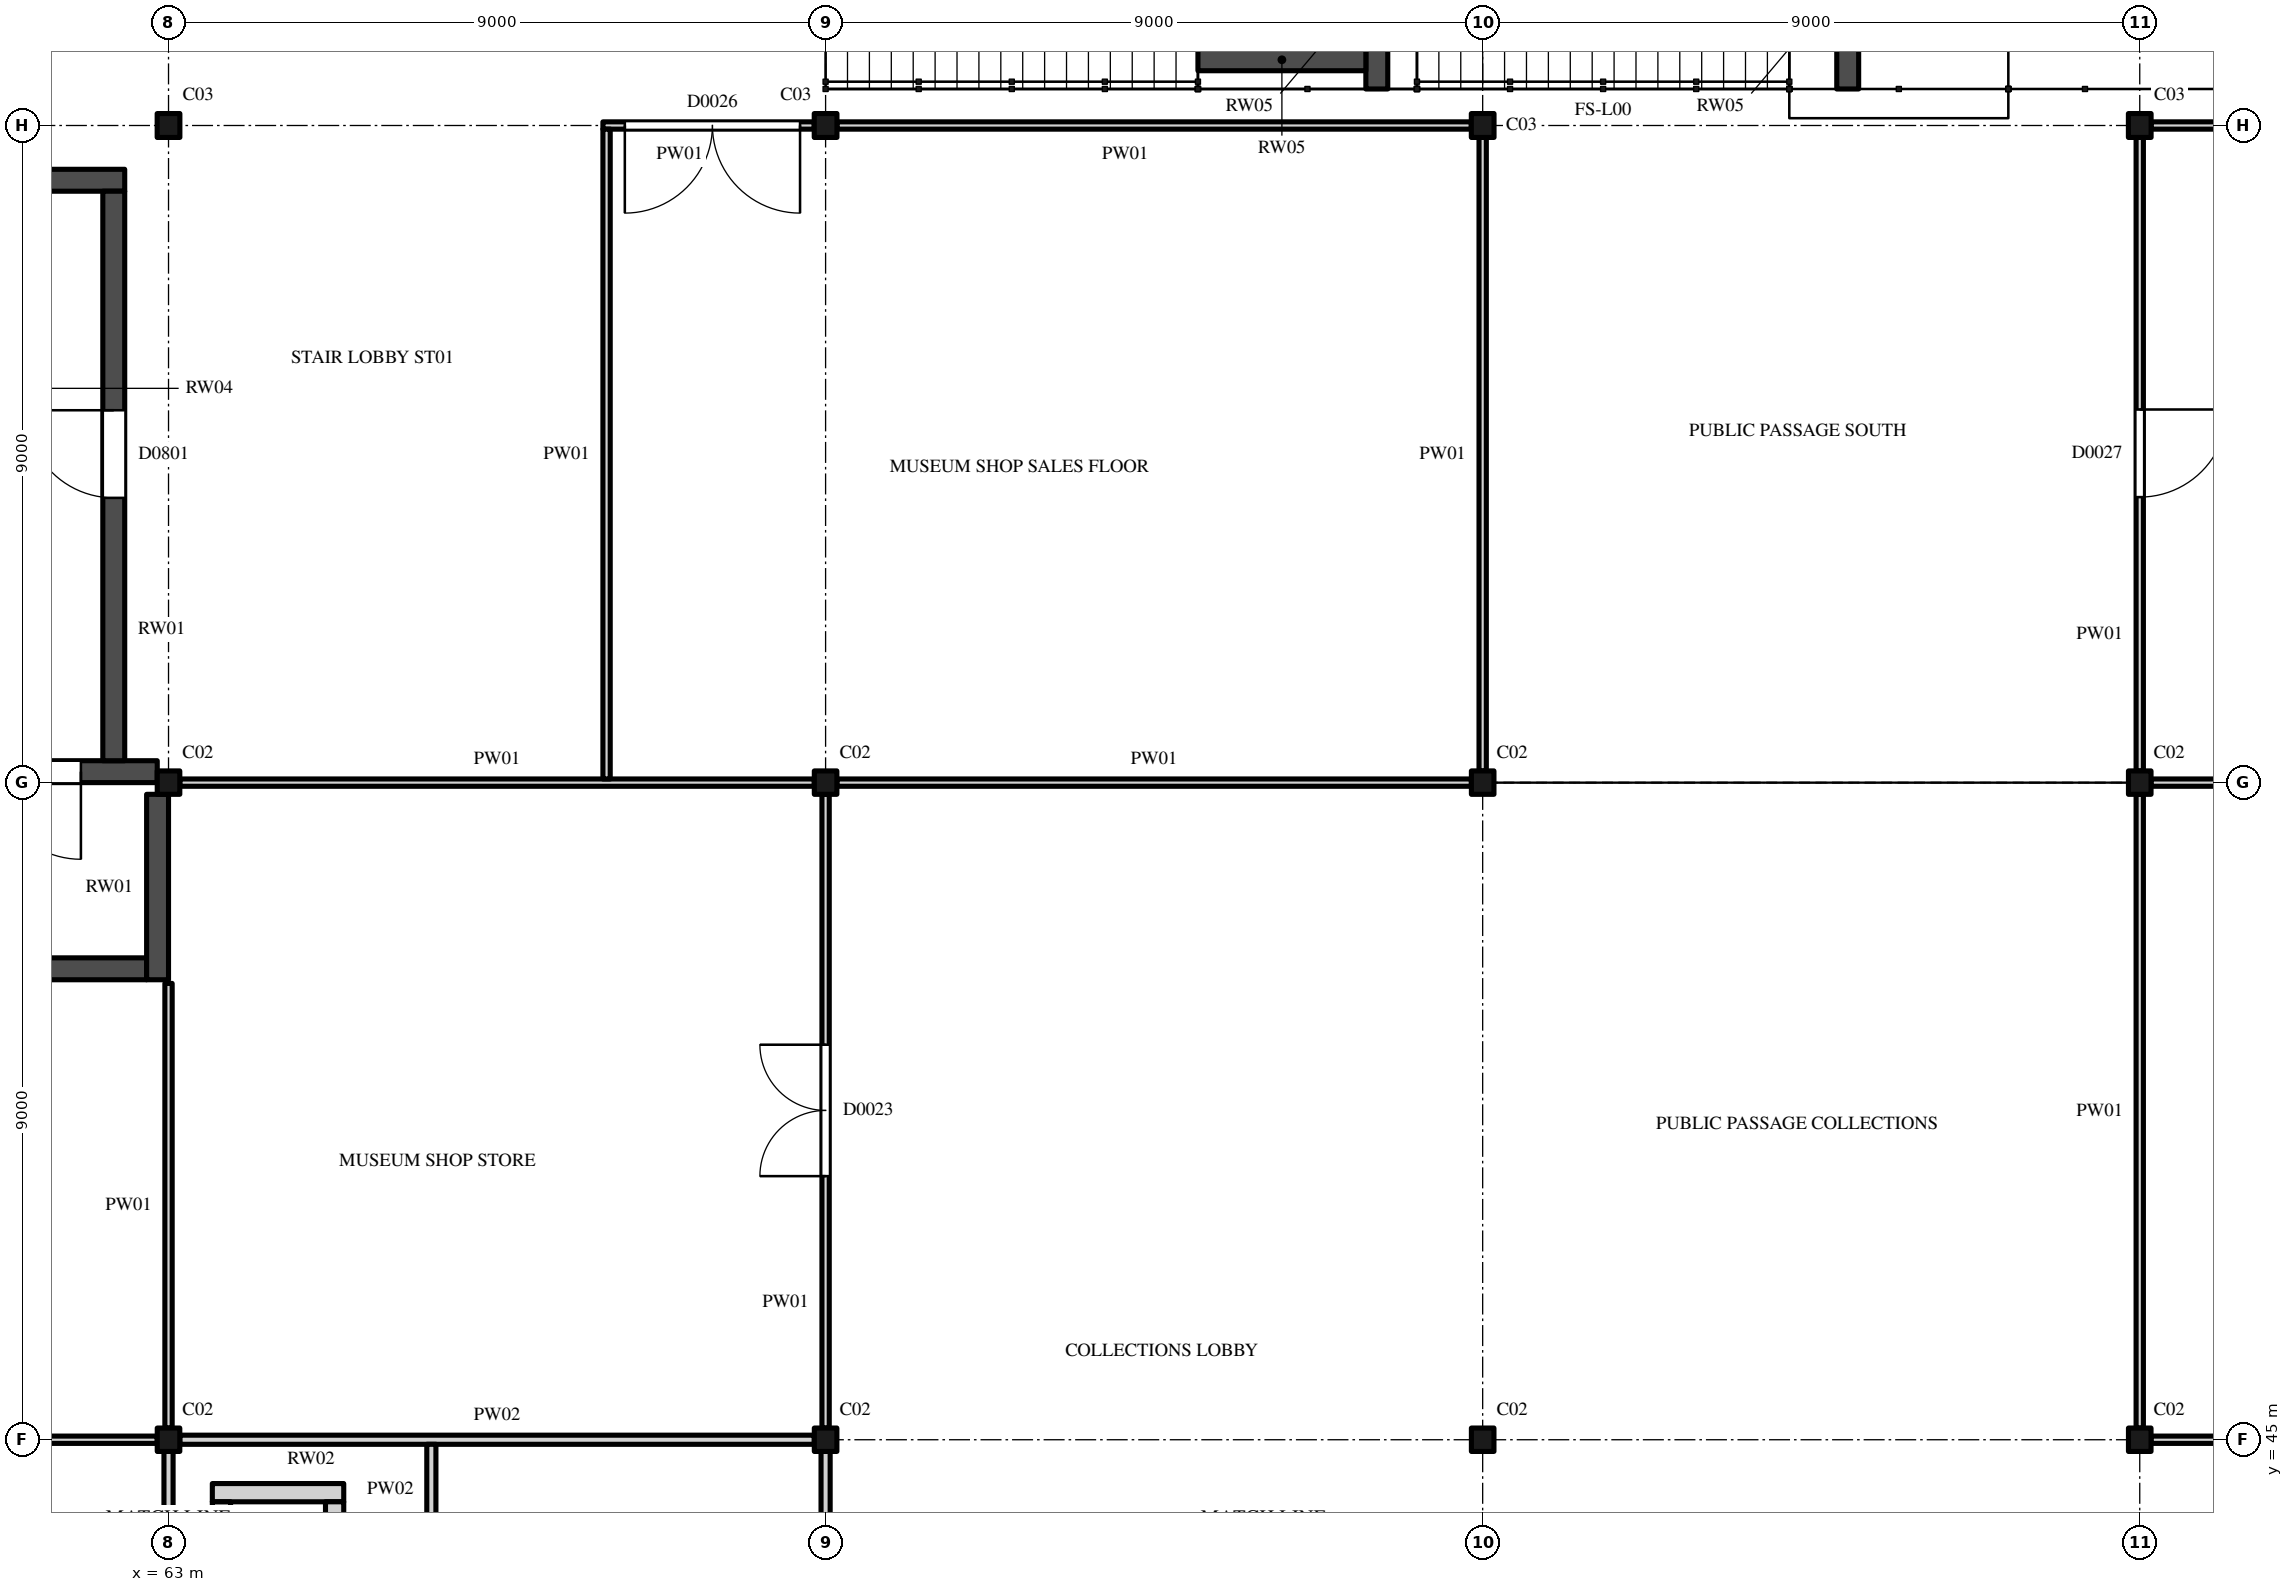
"""IFC4 building model, lengths in metres.
Left out: names, types, materials, properties, quantities, classifications, styles, units other than length and angle.
Written with IfcOpenShell. Run it as: python <this file> out.ifc"""

import sys

from ifc_helpers import new_model, si_unit, direction, frame, frame_2d, origin, origin_2d, place, context, subcontext, project, spatial, rectangle, i_section, extrude, element, fill, save


model = new_model("IFC4")
c1 = context("Model", 3, precision=1e-05, world=origin(), true_north=direction((0.0, 1.0)))
c2 = subcontext(c1, "Body", "Model", "MODEL_VIEW")
j1 = project(units=[si_unit("LENGTHUNIT", "METRE"), si_unit("PLANEANGLEUNIT", "RADIAN")], contexts=[c1])
p1 = place(None, origin())
s1 = spatial("IfcSite", under=j1, at=p1, CompositionType="ELEMENT")
p2 = place(p1, origin())
s2 = spatial("IfcBuilding", under=s1, at=p2, CompositionType="ELEMENT")
p3 = place(p2, origin())
s3 = spatial("IfcBuildingStorey", under=s2, at=p3, CompositionType="ELEMENT", Elevation=0.0)
for number, where, z_axis, x_axis in (
    (1, (63.0, 45.0, 0.0), (0.0, 0.0, 1.0), (1.0, 0.0, 0.0)),
    (2, (72.0, 45.0, 0.0), (0.0, 0.0, 1.0), (1.0, 0.0, 0.0)),
    (3, (81.0, 45.0, 0.0), (0.0, 0.0, 1.0), (1.0, 0.0, 0.0)),
    (4, (90.0, 45.0, 0.0), (0.0, 0.0, 1.0), (1.0, 0.0, 0.0)),
    (5, (63.0, 54.0, 0.0), (0.0, 0.0, 1.0), (1.0, 0.0, 0.0)),
    (6, (72.0, 54.0, 0.0), (0.0, 0.0, 1.0), (1.0, 0.0, 0.0)),
    (7, (81.0, 54.0, 0.0), (0.0, 0.0, 1.0), (1.0, 0.0, 0.0)),
    (8, (90.0, 54.0, 0.0), (0.0, 0.0, 1.0), (1.0, 0.0, 0.0)),
):
    element("IfcColumn", number, at=place(p3, frame(where, z_axis=z_axis, x_axis=x_axis)), inside=s3, PredefinedType="COLUMN", context=c2, shape_type="SweptSolid", body=[
        extrude(i_section(OverallWidth=0.309, OverallDepth=0.321, WebThickness=0.014, FlangeThickness=0.022, FilletRadius=0.017, at=origin_2d()), origin(), (0.0, 0.0, 1.0), 6.0),
    ])
for number, where, z_axis, x_axis in (
    (9, (63.0, 63.0, 0.0), (0.0, 0.0, 1.0), (1.0, 0.0, 0.0)),
    (10, (72.0, 63.0, 0.0), (0.0, 0.0, 1.0), (1.0, 0.0, 0.0)),
    (11, (81.0, 63.0, 0.0), (0.0, 0.0, 1.0), (1.0, 0.0, 0.0)),
    (12, (90.0, 63.0, 0.0), (0.0, 0.0, 1.0), (1.0, 0.0, 0.0)),
):
    element("IfcColumn", number, at=place(p3, frame(where, z_axis=z_axis, x_axis=x_axis)), inside=s3, PredefinedType="COLUMN", context=c2, shape_type="SweptSolid", body=[
        extrude(i_section(OverallWidth=0.311, OverallDepth=0.327, WebThickness=0.016, FlangeThickness=0.025, FilletRadius=0.017, at=origin_2d()), origin(), (0.0, 0.0, 1.0), 6.0),
    ])
p4 = place(p3, frame((54.3, 54.15, 0.0), z_axis=(0.0, 0.0, 1.0), x_axis=(1.0, 0.0, 0.0)))
e13 = element("IfcWall", 13, at=p4, inside=s3, PredefinedType="SHEAR", context=c2, shape_type="SweptSolid", body=[
    extrude(rectangle(XDim=8.545, YDim=0.3, at=frame_2d((4.273, 0.0))), origin(), (0.0, 0.0, 1.0), 6.0),
])
p5 = place(p4, frame((6.3, 0.0, 0.0)))
e14 = element("IfcOpeningElement", 14, at=p5, cuts=e13, PredefinedType="OPENING", context=c2, shape_type="SweptSolid", body=[
    extrude(rectangle(XDim=1.2, YDim=2.1, at=frame_2d((0.6, 1.05))), frame((0.0, 0.16, 0.0), z_axis=(0.0, -1.0, 0.0), x_axis=(1.0, 0.0, 0.0)), (0.0, 0.0, 1.0), 0.32),
])
p6 = place(p3, frame((54.3, 62.25, 0.0), z_axis=(0.0, 0.0, 1.0), x_axis=(1.0, 0.0, 0.0)))
e15 = element("IfcWall", 15, at=p6, inside=s3, PredefinedType="SHEAR", context=c2, shape_type="SweptSolid", body=[
    extrude(rectangle(XDim=8.1, YDim=0.3, at=frame_2d((4.05, 0.0))), origin(), (0.0, 0.0, 1.0), 6.0),
])
p7 = place(p3, frame((62.25, 54.3, 0.0), z_axis=(0.0, 0.0, 1.0), x_axis=(0.0, 1.0, 0.0)))
e16 = element("IfcWall", 16, at=p7, inside=s3, PredefinedType="SHEAR", context=c2, shape_type="SweptSolid", body=[
    extrude(rectangle(XDim=7.8, YDim=0.3, at=frame_2d((3.9, 0.0))), origin(), (0.0, 0.0, 1.0), 6.0),
])
p8 = place(p7, frame((3.6, 0.0, 0.0)))
e17 = element("IfcOpeningElement", 17, at=p8, cuts=e16, PredefinedType="OPENING", context=c2, shape_type="SweptSolid", body=[
    extrude(rectangle(XDim=1.2, YDim=2.1, at=frame_2d((0.6, 1.05))), frame((0.0, 0.16, 0.0), z_axis=(0.0, -1.0, 0.0), x_axis=(1.0, 0.0, 0.0)), (0.0, 0.0, 1.0), 0.32),
])
p9 = place(p3, frame((54.3, 51.45, 0.0), z_axis=(0.0, 0.0, 1.0), x_axis=(1.0, 0.0, 0.0)))
e18 = element("IfcWall", 18, at=p9, inside=s3, PredefinedType="SHEAR", context=c2, shape_type="SweptSolid", body=[
    extrude(rectangle(XDim=8.4, YDim=0.3, at=frame_2d((4.2, 0.0))), origin(), (0.0, 0.0, 1.0), 6.0),
])
p10 = place(p3, frame((62.85, 51.3, 0.0), z_axis=(0.0, 0.0, 1.0), x_axis=(0.0, 1.0, 0.0)))
e19 = element("IfcWall", 19, at=p10, inside=s3, PredefinedType="SHEAR", context=c2, shape_type="SweptSolid", body=[
    extrude(rectangle(XDim=2.54, YDim=0.3, at=frame_2d((1.27, 0.0))), origin(), (0.0, 0.0, 1.0), 6.0),
])
p11 = place(p3, frame((63.6, 44.275, 0.0), z_axis=(0.0, 0.0, 1.0), x_axis=(1.0, 0.0, 0.0)))
e20 = element("IfcWall", 20, at=p11, inside=s3, PredefinedType="STANDARD", context=c2, shape_type="SweptSolid", body=[
    extrude(rectangle(XDim=1.8, YDim=0.25, at=frame_2d((0.9, 0.0))), origin(), (0.0, 0.0, 1.0), 6.0),
])
p12 = place(p3, frame((63.725, 41.65, 0.0), z_axis=(0.0, 0.0, 1.0), x_axis=(0.0, 1.0, 0.0)))
e21 = element("IfcWall", 21, at=p12, inside=s3, PredefinedType="STANDARD", context=c2, shape_type="SweptSolid", body=[
    extrude(rectangle(XDim=2.5, YDim=0.25, at=frame_2d((1.25, 0.0))), origin(), (0.0, 0.0, 1.0), 6.0),
])
p13 = place(p3, frame((65.275, 41.65, 0.0), z_axis=(0.0, 0.0, 1.0), x_axis=(0.0, 1.0, 0.0)))
e22 = element("IfcWall", 22, at=p13, inside=s3, PredefinedType="STANDARD", context=c2, shape_type="SweptSolid", body=[
    extrude(rectangle(XDim=2.5, YDim=0.25, at=frame_2d((1.25, 0.0))), origin(), (0.0, 0.0, 1.0), 6.0),
])
p14 = place(p13, frame((0.8, 0.0, 0.0)))
e23 = element("IfcOpeningElement", 23, at=p14, cuts=e22, PredefinedType="OPENING", context=c2, shape_type="SweptSolid", body=[
    extrude(rectangle(XDim=0.9, YDim=2.1, at=frame_2d((0.45, 1.05))), frame((0.0, 0.135, 0.0), z_axis=(0.0, -1.0, 0.0), x_axis=(1.0, 0.0, 0.0)), (0.0, 0.0, 1.0), 0.27),
])
p15 = place(p3, frame((79.55, 63.5, 0.0), z_axis=(0.0, 0.0, 1.0), x_axis=(0.0, 1.0, 0.0)))
e24 = element("IfcWall", 24, at=p15, inside=s3, PredefinedType="SHEAR", context=c2, shape_type="SweptSolid", body=[
    extrude(rectangle(XDim=3.0, YDim=0.3, at=frame_2d((1.5, 0.0))), origin(), (0.0, 0.0, 1.0), 2.8),
])
p16 = place(p3, frame((77.1, 63.9, 0.0), z_axis=(0.0, 0.0, 1.0), x_axis=(1.0, 0.0, 0.0)))
e25 = element("IfcWall", 25, at=p16, inside=s3, PredefinedType="SHEAR", context=c2, shape_type="SweptSolid", body=[
    extrude(rectangle(XDim=2.3, YDim=0.3, at=frame_2d((1.15, 0.0))), origin(), (0.0, 0.0, 1.0), 2.8),
])
p17 = place(p3, frame((86.0, 63.5, 0.0), z_axis=(0.0, 0.0, 1.0), x_axis=(0.0, 1.0, 0.0)))
e26 = element("IfcWall", 26, at=p17, inside=s3, PredefinedType="SHEAR", context=c2, shape_type="SweptSolid", body=[
    extrude(rectangle(XDim=3.0, YDim=0.3, at=frame_2d((1.5, 0.0))), origin(), (0.0, 0.0, 1.0), 5.8),
])
p18 = place(p3, frame((54.35, 45.0, 0.0), z_axis=(0.0, 0.0, 1.0), x_axis=(1.0, 0.0, 0.0)))
e27 = element("IfcWall", 27, at=p18, inside=s3, PredefinedType="PARTITIONING", context=c2, shape_type="SweptSolid", body=[
    extrude(rectangle(XDim=8.495, YDim=0.1, at=frame_2d((4.248, 0.0))), origin(), (0.0, 0.0, 1.0), 5.419),
])
p19 = place(p3, frame((63.155, 45.0, 0.0), z_axis=(0.0, 0.0, 1.0), x_axis=(1.0, 0.0, 0.0)))
e28 = element("IfcWall", 28, at=p19, inside=s3, PredefinedType="PARTITIONING", context=c2, shape_type="SweptSolid", body=[
    extrude(rectangle(XDim=8.691, YDim=0.125, at=frame_2d((4.345, 0.0))), origin(), (0.0, 0.0, 1.0), 5.419),
])
p20 = place(p3, frame((90.155, 45.0, 0.0), z_axis=(0.0, 0.0, 1.0), x_axis=(1.0, 0.0, 0.0)))
e29 = element("IfcWall", 29, at=p20, inside=s3, PredefinedType="PARTITIONING", context=c2, shape_type="SweptSolid", body=[
    extrude(rectangle(XDim=8.691, YDim=0.1, at=frame_2d((4.345, 0.0))), origin(), (0.0, 0.0, 1.0), 5.419),
])
p21 = place(p20, frame((3.85, 0.0, 0.0)))
e30 = element("IfcOpeningElement", 30, at=p21, cuts=e29, PredefinedType="OPENING", context=c2, shape_type="SweptSolid", body=[
    extrude(rectangle(XDim=1.0, YDim=2.1, at=frame_2d((0.5, 1.05))), frame((0.0, 0.06, 0.0), z_axis=(0.0, -1.0, 0.0), x_axis=(1.0, 0.0, 0.0)), (0.0, 0.0, 1.0), 0.12),
])
for number, where, z_axis, x_axis in (
    (31, (63.155, 54.0, 0.0), (0.0, 0.0, 1.0), (1.0, 0.0, 0.0)),
    (32, (72.155, 54.0, 0.0), (0.0, 0.0, 1.0), (1.0, 0.0, 0.0)),
    (33, (90.155, 54.0, 0.0), (0.0, 0.0, 1.0), (1.0, 0.0, 0.0)),
):
    element("IfcWall", number, at=place(p3, frame(where, z_axis=z_axis, x_axis=x_axis)), inside=s3, PredefinedType="PARTITIONING", context=c2, shape_type="SweptSolid", body=[
        extrude(rectangle(XDim=8.691, YDim=0.1, at=frame_2d((4.345, 0.0))), origin(), (0.0, 0.0, 1.0), 5.466),
    ])
p22 = place(p3, frame((68.95, 63.0, 0.0), z_axis=(0.0, 0.0, 1.0), x_axis=(1.0, 0.0, 0.0)))
e34 = element("IfcWall", 34, at=p22, inside=s3, PredefinedType="PARTITIONING", context=c2, shape_type="SweptSolid", body=[
    extrude(rectangle(XDim=2.895, YDim=0.1, at=frame_2d((1.447, 0.0))), origin(), (0.0, 0.0, 1.0), 5.422),
])
p23 = place(p22, frame((0.3, 0.0, 0.0)))
e35 = element("IfcOpeningElement", 35, at=p23, cuts=e34, PredefinedType="OPENING", context=c2, shape_type="SweptSolid", body=[
    extrude(rectangle(XDim=2.4, YDim=2.4, at=frame_2d((1.2, 1.2))), frame((0.0, 0.06, 0.0), z_axis=(0.0, -1.0, 0.0), x_axis=(1.0, 0.0, 0.0)), (0.0, 0.0, 1.0), 0.12),
])
p24 = place(p3, frame((72.156, 63.0, 0.0), z_axis=(0.0, 0.0, 1.0), x_axis=(1.0, 0.0, 0.0)))
e36 = element("IfcWall", 36, at=p24, inside=s3, PredefinedType="PARTITIONING", context=c2, shape_type="SweptSolid", body=[
    extrude(rectangle(XDim=8.689, YDim=0.1, at=frame_2d((4.344, 0.0))), origin(), (0.0, 0.0, 1.0), 5.422),
])
p25 = place(p3, frame((90.156, 63.0, 0.0), z_axis=(0.0, 0.0, 1.0), x_axis=(1.0, 0.0, 0.0)))
e37 = element("IfcWall", 37, at=p25, inside=s3, PredefinedType="PARTITIONING", context=c2, shape_type="SweptSolid", body=[
    extrude(rectangle(XDim=5.907, YDim=0.1, at=frame_2d((2.954, 0.0))), origin(), (0.0, 0.0, 1.0), 5.422),
])
p26 = place(p3, frame((63.0, 36.16, 0.0), z_axis=(0.0, 0.0, 1.0), x_axis=(0.0, 1.0, 0.0)))
e38 = element("IfcWall", 38, at=p26, inside=s3, PredefinedType="PARTITIONING", context=c2, shape_type="SweptSolid", body=[
    extrude(rectangle(XDim=8.679, YDim=0.125, at=frame_2d((4.34, 0.0))), origin(), (0.0, 0.0, 1.0), 5.292),
])
p27 = place(p26, frame((3.29, 0.0, 0.0)))
e39 = element("IfcOpeningElement", 39, at=p27, cuts=e38, PredefinedType="OPENING", context=c2, shape_type="SweptSolid", body=[
    extrude(rectangle(XDim=1.5, YDim=2.1, at=frame_2d((0.75, 1.05))), frame((0.0, 0.073, 0.0), z_axis=(0.0, -1.0, 0.0), x_axis=(1.0, 0.0, 0.0)), (0.0, 0.0, 1.0), 0.145),
])
p28 = place(p3, frame((63.0, 45.16, 0.0), z_axis=(0.0, 0.0, 1.0), x_axis=(0.0, 1.0, 0.0)))
e40 = element("IfcWall", 40, at=p28, inside=s3, PredefinedType="PARTITIONING", context=c2, shape_type="SweptSolid", body=[
    extrude(rectangle(XDim=6.09, YDim=0.1, at=frame_2d((3.045, 0.0))), origin(), (0.0, 0.0, 1.0), 5.292),
])
p29 = place(p3, frame((66.6, 41.462, 0.0), z_axis=(0.0, 0.0, 1.0), x_axis=(0.0, 1.0, 0.0)))
e41 = element("IfcWall", 41, at=p29, inside=s3, PredefinedType="PARTITIONING", context=c2, shape_type="SweptSolid", body=[
    extrude(rectangle(XDim=3.475, YDim=0.125, at=frame_2d((1.738, 0.0))), origin(), (0.0, 0.0, 1.0), 5.825),
])
p30 = place(p29, frame((1.25, 0.0, 0.0)))
e42 = element("IfcOpeningElement", 42, at=p30, cuts=e41, PredefinedType="OPENING", context=c2, shape_type="SweptSolid", body=[
    extrude(rectangle(XDim=1.0, YDim=2.1, at=frame_2d((0.5, 1.05))), frame((0.0, 0.073, 0.0), z_axis=(0.0, -1.0, 0.0), x_axis=(1.0, 0.0, 0.0)), (0.0, 0.0, 1.0), 0.145),
])
p31 = place(p3, frame((69.0, 54.05, 0.0), z_axis=(0.0, 0.0, 1.0), x_axis=(0.0, 1.0, 0.0)))
e43 = element("IfcWall", 43, at=p31, inside=s3, PredefinedType="PARTITIONING", context=c2, shape_type="SweptSolid", body=[
    extrude(rectangle(XDim=8.9, YDim=0.1, at=frame_2d((4.45, 0.0))), origin(), (0.0, 0.0, 1.0), 5.825),
])
p32 = place(p3, frame((72.0, 41.462, 0.0), z_axis=(0.0, 0.0, 1.0), x_axis=(0.0, 1.0, 0.0)))
e44 = element("IfcWall", 44, at=p32, inside=s3, PredefinedType="PARTITIONING", context=c2, shape_type="SweptSolid", body=[
    extrude(rectangle(XDim=3.377, YDim=0.125, at=frame_2d((1.688, 0.0))), origin(), (0.0, 0.0, 1.0), 5.292),
])
p33 = place(p3, frame((72.0, 45.16, 0.0), z_axis=(0.0, 0.0, 1.0), x_axis=(0.0, 1.0, 0.0)))
e45 = element("IfcWall", 45, at=p33, inside=s3, PredefinedType="PARTITIONING", context=c2, shape_type="SweptSolid", body=[
    extrude(rectangle(XDim=8.679, YDim=0.1, at=frame_2d((4.34, 0.0))), origin(), (0.0, 0.0, 1.0), 5.292),
])
p34 = place(p33, frame((3.45, 0.0, 0.0)))
e46 = element("IfcOpeningElement", 46, at=p34, cuts=e45, PredefinedType="OPENING", context=c2, shape_type="SweptSolid", body=[
    extrude(rectangle(XDim=1.8, YDim=2.4, at=frame_2d((0.9, 1.2))), frame((0.0, 0.06, 0.0), z_axis=(0.0, -1.0, 0.0), x_axis=(1.0, 0.0, 0.0)), (0.0, 0.0, 1.0), 0.12),
])
p35 = place(p3, frame((81.0, 54.16, 0.0), z_axis=(0.0, 0.0, 1.0), x_axis=(0.0, 1.0, 0.0)))
e47 = element("IfcWall", 47, at=p35, inside=s3, PredefinedType="PARTITIONING", context=c2, shape_type="SweptSolid", body=[
    extrude(rectangle(XDim=8.676, YDim=0.1, at=frame_2d((4.338, 0.0))), origin(), (0.0, 0.0, 1.0), 5.365),
])
p36 = place(p3, frame((90.0, 45.16, 0.0), z_axis=(0.0, 0.0, 1.0), x_axis=(0.0, 1.0, 0.0)))
e48 = element("IfcWall", 48, at=p36, inside=s3, PredefinedType="PARTITIONING", context=c2, shape_type="SweptSolid", body=[
    extrude(rectangle(XDim=8.679, YDim=0.1, at=frame_2d((4.34, 0.0))), origin(), (0.0, 0.0, 1.0), 5.292),
])
p37 = place(p3, frame((90.0, 54.16, 0.0), z_axis=(0.0, 0.0, 1.0), x_axis=(0.0, 1.0, 0.0)))
e49 = element("IfcWall", 49, at=p37, inside=s3, PredefinedType="PARTITIONING", context=c2, shape_type="SweptSolid", body=[
    extrude(rectangle(XDim=8.676, YDim=0.1, at=frame_2d((4.338, 0.0))), origin(), (0.0, 0.0, 1.0), 5.365),
])
p38 = place(p37, frame((3.75, 0.0, 0.0)))
e50 = element("IfcOpeningElement", 50, at=p38, cuts=e49, PredefinedType="OPENING", context=c2, shape_type="SweptSolid", body=[
    extrude(rectangle(XDim=1.2, YDim=2.1, at=frame_2d((0.6, 1.05))), frame((0.0, 0.06, 0.0), z_axis=(0.0, -1.0, 0.0), x_axis=(1.0, 0.0, 0.0)), (0.0, 0.0, 1.0), 0.12),
])
p39 = place(p8, origin())
e51 = element("IfcDoor", 51, at=p39, inside=s3, OperationType="SINGLE_SWING_LEFT", PredefinedType="DOOR", context=c2, shape_type="SweptSolid", body=[
    extrude(rectangle(XDim=1.2, YDim=2.1, at=frame_2d((0.6, 1.05))), frame((0.0, 0.025, 0.0), z_axis=(0.0, -1.0, 0.0), x_axis=(1.0, 0.0, 0.0)), (0.0, 0.0, 1.0), 0.05),
])
fill(e17, e51)
p40 = place(p5, origin())
e52 = element("IfcDoor", 52, at=p40, inside=s3, OperationType="SINGLE_SWING_RIGHT", PredefinedType="DOOR", context=c2, shape_type="SweptSolid", body=[
    extrude(rectangle(XDim=1.2, YDim=2.1, at=frame_2d((0.6, 1.05))), frame((0.0, 0.025, 0.0), z_axis=(0.0, -1.0, 0.0), x_axis=(1.0, 0.0, 0.0)), (0.0, 0.0, 1.0), 0.05),
])
fill(e14, e52)
p41 = place(p34, origin())
e53 = element("IfcDoor", 53, at=p41, inside=s3, OperationType="DOUBLE_DOOR_SINGLE_SWING", PredefinedType="DOOR", context=c2, shape_type="SweptSolid", body=[
    extrude(rectangle(XDim=1.8, YDim=2.4, at=frame_2d((0.9, 1.2))), frame((0.0, 0.025, 0.0), z_axis=(0.0, -1.0, 0.0), x_axis=(1.0, 0.0, 0.0)), (0.0, 0.0, 1.0), 0.05),
])
fill(e46, e53)
p42 = place(p23, origin())
e54 = element("IfcDoor", 54, at=p42, inside=s3, OperationType="DOUBLE_DOOR_SINGLE_SWING", PredefinedType="DOOR", context=c2, shape_type="SweptSolid", body=[
    extrude(rectangle(XDim=2.4, YDim=2.4, at=frame_2d((1.2, 1.2))), frame((0.0, 0.025, 0.0), z_axis=(0.0, -1.0, 0.0), x_axis=(1.0, 0.0, 0.0)), (0.0, 0.0, 1.0), 0.05),
])
fill(e35, e54)
p43 = place(p38, origin())
e55 = element("IfcDoor", 55, at=p43, inside=s3, OperationType="SINGLE_SWING_RIGHT", PredefinedType="DOOR", context=c2, shape_type="SweptSolid", body=[
    extrude(rectangle(XDim=1.2, YDim=2.1, at=frame_2d((0.6, 1.05))), frame((0.0, 0.025, 0.0), z_axis=(0.0, -1.0, 0.0), x_axis=(1.0, 0.0, 0.0)), (0.0, 0.0, 1.0), 0.05),
])
fill(e50, e55)
save(model, sys.argv[1])
